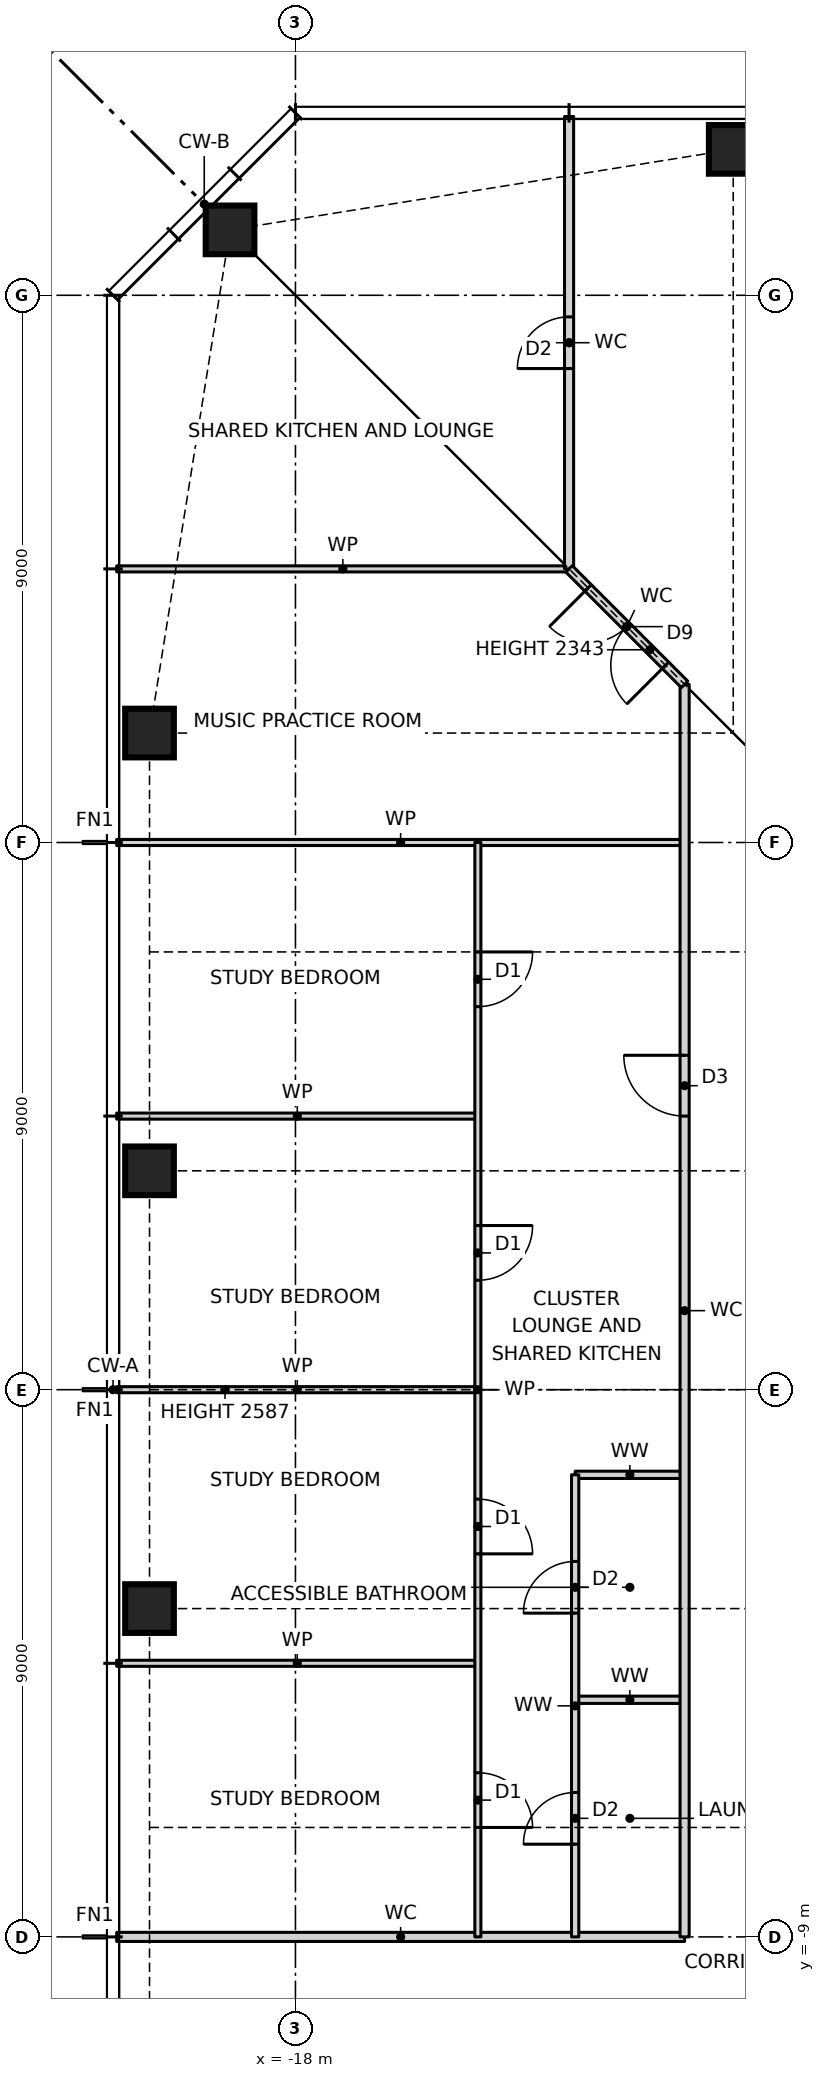
"""IFC4 building model, lengths in metres.
Left out: names, types, materials, properties, quantities, classifications, styles, units other than length and angle.
Written with IfcOpenShell. Run it as: python <this file> out.ifc"""

import sys

from ifc_helpers import new_model, si_unit, direction, frame, frame_2d, origin, origin_2d, place, context, subcontext, project, spatial, rectangle, hollow_rectangle, extrude, element, fill, save


model = new_model("IFC4")
c1 = context("Model", 3, precision=1e-05, world=origin(), true_north=direction((0.0, 1.0)))
c2 = subcontext(c1, "Body", "Model", "MODEL_VIEW")
j1 = project(units=[si_unit("LENGTHUNIT", "METRE"), si_unit("PLANEANGLEUNIT", "RADIAN")], contexts=[c1])
p1 = place(None, origin())
s1 = spatial("IfcSite", under=j1, at=p1, CompositionType="ELEMENT")
p2 = place(p1, origin())
s2 = spatial("IfcBuilding", under=s1, at=p2, CompositionType="ELEMENT")
p3 = place(p2, frame((0.0, 0.0, 105.0)))
s3 = spatial("IfcBuildingStorey", under=s2, at=p3, CompositionType="ELEMENT", Elevation=105.0)
for number, where, z_axis, x_axis in (
    (1, (-10.8, 20.4, 0.0), (0.0, 0.0, 1.0), (1.0, 0.0, 0.0)),
    (2, (-19.076, 19.076, 0.0), (0.0, 0.0, 1.0), (1.0, 0.0, 0.0)),
    (3, (-20.4, 10.8, 0.0), (0.0, 0.0, 1.0), (1.0, 0.0, 0.0)),
    (4, (-20.4, 3.6, 0.0), (0.0, 0.0, 1.0), (1.0, 0.0, 0.0)),
    (5, (-20.4, -3.6, 0.0), (0.0, 0.0, 1.0), (1.0, 0.0, 0.0)),
):
    element("IfcColumn", number, at=place(p3, frame(where, z_axis=z_axis, x_axis=x_axis)), inside=s3, PredefinedType="COLUMN", context=c2, shape_type="SweptSolid", body=[
        extrude(hollow_rectangle(XDim=0.8, YDim=0.8, WallThickness=0.07, at=origin_2d()), origin(), (0.0, 0.0, 1.0), 3.5),
    ])
p4 = place(p3, frame((-20.94, -9.0, 0.0), z_axis=(0.0, 0.0, 1.0), x_axis=(1.0, 0.0, 0.0)))
e6 = element("IfcWall", 6, at=p4, inside=s3, PredefinedType="PARTITIONING", context=c2, shape_type="SweptSolid", body=[
    extrude(rectangle(XDim=9.34, YDim=0.15, at=frame_2d((4.67, 0.0))), origin(), (0.0, 0.0, 1.0), 3.27),
])
p5 = place(p3, frame((-13.4, -5.1, 0.0), z_axis=(0.0, 0.0, 1.0), x_axis=(1.0, 0.0, 0.0)))
e7 = element("IfcWall", 7, at=p5, inside=s3, PredefinedType="PARTITIONING", context=c2, shape_type="SweptSolid", body=[
    extrude(rectangle(XDim=1.8, YDim=0.12, at=frame_2d((0.9, 0.0))), origin(), (0.0, 0.0, 1.0), 3.27),
])
p6 = place(p3, frame((-20.94, -4.5, 0.0), z_axis=(0.0, 0.0, 1.0), x_axis=(1.0, 0.0, 0.0)))
e8 = element("IfcWall", 8, at=p6, inside=s3, PredefinedType="PARTITIONING", context=c2, shape_type="SweptSolid", body=[
    extrude(rectangle(XDim=5.94, YDim=0.1, at=frame_2d((2.97, 0.0))), origin(), (0.0, 0.0, 1.0), 3.27),
])
p7 = place(p3, frame((-13.4, -1.4, 0.0), z_axis=(0.0, 0.0, 1.0), x_axis=(1.0, 0.0, 0.0)))
e9 = element("IfcWall", 9, at=p7, inside=s3, PredefinedType="PARTITIONING", context=c2, shape_type="SweptSolid", body=[
    extrude(rectangle(XDim=1.8, YDim=0.12, at=frame_2d((0.9, 0.0))), origin(), (0.0, 0.0, 1.0), 3.27),
])
p8 = place(p3, frame((-20.94, 0.0, 0.0), z_axis=(0.0, 0.0, 1.0), x_axis=(1.0, 0.0, 0.0)))
e10 = element("IfcWall", 10, at=p8, inside=s3, PredefinedType="PARTITIONING", context=c2, shape_type="SweptSolid", body=[
    extrude(rectangle(XDim=5.94, YDim=0.1, at=frame_2d((2.97, 0.0))), origin(), (0.0, 0.0, 1.0), 2.587),
])
p9 = place(p3, frame((-20.94, 4.5, 0.0), z_axis=(0.0, 0.0, 1.0), x_axis=(1.0, 0.0, 0.0)))
e11 = element("IfcWall", 11, at=p9, inside=s3, PredefinedType="PARTITIONING", context=c2, shape_type="SweptSolid", body=[
    extrude(rectangle(XDim=5.94, YDim=0.1, at=frame_2d((2.97, 0.0))), origin(), (0.0, 0.0, 1.0), 3.27),
])
p10 = place(p3, frame((-20.94, 9.0, 0.0), z_axis=(0.0, 0.0, 1.0), x_axis=(1.0, 0.0, 0.0)))
e12 = element("IfcWall", 12, at=p10, inside=s3, PredefinedType="PARTITIONING", context=c2, shape_type="SweptSolid", body=[
    extrude(rectangle(XDim=9.34, YDim=0.1, at=frame_2d((4.67, 0.0))), origin(), (0.0, 0.0, 1.0), 3.27),
])
p11 = place(p3, frame((-20.94, 13.5, 0.0), z_axis=(0.0, 0.0, 1.0), x_axis=(1.0, 0.0, 0.0)))
e13 = element("IfcWall", 13, at=p11, inside=s3, PredefinedType="PARTITIONING", context=c2, shape_type="SweptSolid", body=[
    extrude(rectangle(XDim=7.44, YDim=0.1, at=frame_2d((3.72, 0.0))), origin(), (0.0, 0.0, 1.0), 3.27),
])
p12 = place(p3, frame((-11.6, -9.0, 0.0), z_axis=(0.0, 0.0, 1.0), x_axis=(0.0, 1.0, 0.0)))
e14 = element("IfcWall", 14, at=p12, inside=s3, PredefinedType="PARTITIONING", context=c2, shape_type="SweptSolid", body=[
    extrude(rectangle(XDim=20.6, YDim=0.15, at=frame_2d((10.3, 0.0))), origin(), (0.0, 0.0, 1.0), 3.27),
])
p13 = place(p12, frame((13.5, 0.0, 0.0)))
e15 = element("IfcOpeningElement", 15, at=p13, cuts=e14, PredefinedType="OPENING", context=c2, shape_type="SweptSolid", body=[
    extrude(rectangle(XDim=1.0, YDim=2.1, at=frame_2d((0.5, 1.05))), frame((0.0, 0.085, 0.0), z_axis=(0.0, -1.0, 0.0), x_axis=(1.0, 0.0, 0.0)), (0.0, 0.0, 1.0), 0.17),
])
p14 = place(p3, frame((-13.4, -9.0, 0.0), z_axis=(0.0, 0.0, 1.0), x_axis=(0.0, 1.0, 0.0)))
e16 = element("IfcWall", 16, at=p14, inside=s3, PredefinedType="PARTITIONING", context=c2, shape_type="SweptSolid", body=[
    extrude(rectangle(XDim=7.6, YDim=0.12, at=frame_2d((3.8, 0.0))), origin(), (0.0, 0.0, 1.0), 3.27),
])
p15 = place(p14, frame((5.325, 0.0, 0.0)))
e17 = element("IfcOpeningElement", 17, at=p15, cuts=e16, PredefinedType="OPENING", context=c2, shape_type="SweptSolid", body=[
    extrude(rectangle(XDim=0.85, YDim=2.1, at=frame_2d((0.425, 1.05))), frame((0.0, 0.07, 0.0), z_axis=(0.0, -1.0, 0.0), x_axis=(1.0, 0.0, 0.0)), (0.0, 0.0, 1.0), 0.14),
])
p16 = place(p14, frame((1.525, 0.0, 0.0)))
e18 = element("IfcOpeningElement", 18, at=p16, cuts=e16, PredefinedType="OPENING", context=c2, shape_type="SweptSolid", body=[
    extrude(rectangle(XDim=0.85, YDim=2.1, at=frame_2d((0.425, 1.05))), frame((0.0, 0.07, 0.0), z_axis=(0.0, -1.0, 0.0), x_axis=(1.0, 0.0, 0.0)), (0.0, 0.0, 1.0), 0.14),
])
p17 = place(p3, frame((-13.5, 13.5, 0.0), z_axis=(0.0, 0.0, 1.0), x_axis=(0.0, 1.0, 0.0)))
e19 = element("IfcWall", 19, at=p17, inside=s3, PredefinedType="PARTITIONING", context=c2, shape_type="SweptSolid", body=[
    extrude(rectangle(XDim=7.44, YDim=0.15, at=frame_2d((3.72, 0.0))), origin(), (0.0, 0.0, 1.0), 3.27),
])
p18 = place(p17, frame((3.295, 0.0, 0.0)))
e20 = element("IfcOpeningElement", 20, at=p18, cuts=e19, PredefinedType="OPENING", context=c2, shape_type="SweptSolid", body=[
    extrude(rectangle(XDim=0.85, YDim=2.1, at=frame_2d((0.425, 1.05))), frame((0.0, 0.085, 0.0), z_axis=(0.0, -1.0, 0.0), x_axis=(1.0, 0.0, 0.0)), (0.0, 0.0, 1.0), 0.17),
])
p19 = place(p3, frame((-15.0, -9.0, 0.0), z_axis=(0.0, 0.0, 1.0), x_axis=(0.0, 1.0, 0.0)))
e21 = element("IfcWall", 21, at=p19, inside=s3, PredefinedType="PARTITIONING", context=c2, shape_type="SweptSolid", body=[
    extrude(rectangle(XDim=18.0, YDim=0.1, at=frame_2d((9.0, 0.0))), origin(), (0.0, 0.0, 1.0), 3.27),
])
p20 = place(p19, frame((15.3, 0.0, 0.0)))
e22 = element("IfcOpeningElement", 22, at=p20, cuts=e21, PredefinedType="OPENING", context=c2, shape_type="SweptSolid", body=[
    extrude(rectangle(XDim=0.9, YDim=2.1, at=frame_2d((0.45, 1.05))), frame((0.0, 0.06, 0.0), z_axis=(0.0, -1.0, 0.0), x_axis=(1.0, 0.0, 0.0)), (0.0, 0.0, 1.0), 0.12),
])
p21 = place(p19, frame((10.8, 0.0, 0.0)))
e23 = element("IfcOpeningElement", 23, at=p21, cuts=e21, PredefinedType="OPENING", context=c2, shape_type="SweptSolid", body=[
    extrude(rectangle(XDim=0.9, YDim=2.1, at=frame_2d((0.45, 1.05))), frame((0.0, 0.06, 0.0), z_axis=(0.0, -1.0, 0.0), x_axis=(1.0, 0.0, 0.0)), (0.0, 0.0, 1.0), 0.12),
])
p22 = place(p19, frame((6.3, 0.0, 0.0)))
e24 = element("IfcOpeningElement", 24, at=p22, cuts=e21, PredefinedType="OPENING", context=c2, shape_type="SweptSolid", body=[
    extrude(rectangle(XDim=0.9, YDim=2.1, at=frame_2d((0.45, 1.05))), frame((0.0, 0.06, 0.0), z_axis=(0.0, -1.0, 0.0), x_axis=(1.0, 0.0, 0.0)), (0.0, 0.0, 1.0), 0.12),
])
p23 = place(p19, frame((1.8, 0.0, 0.0)))
e25 = element("IfcOpeningElement", 25, at=p23, cuts=e21, PredefinedType="OPENING", context=c2, shape_type="SweptSolid", body=[
    extrude(rectangle(XDim=0.9, YDim=2.1, at=frame_2d((0.45, 1.05))), frame((0.0, 0.06, 0.0), z_axis=(0.0, -1.0, 0.0), x_axis=(1.0, 0.0, 0.0)), (0.0, 0.0, 1.0), 0.12),
])
p24 = place(p3, frame((-11.6, 11.6, 0.0), z_axis=(0.0, 0.0, 1.0), x_axis=(-0.707106781187, 0.707106781187, 0.0)))
e26 = element("IfcWall", 26, at=p24, inside=s3, PredefinedType="PARTITIONING", context=c2, shape_type="SweptSolid", body=[
    extrude(rectangle(XDim=2.687, YDim=0.15, at=frame_2d((1.343, 0.0))), origin(), (0.0, 0.0, 1.0), 2.343),
])
p25 = place(p24, frame((0.444, 0.0, 0.0)))
e27 = element("IfcOpeningElement", 27, at=p25, cuts=e26, PredefinedType="OPENING", context=c2, shape_type="SweptSolid", body=[
    extrude(rectangle(XDim=1.8, YDim=2.1, at=frame_2d((0.9, 1.05))), frame((0.0, 0.085, 0.0), z_axis=(0.0, -1.0, 0.0), x_axis=(1.0, 0.0, 0.0)), (0.0, 0.0, 1.0), 0.17),
])
p26 = place(p25, origin())
e28 = element("IfcDoor", 28, at=p26, inside=s3, OperationType="DOUBLE_DOOR_SINGLE_SWING", PredefinedType="DOOR", context=c2, shape_type="SweptSolid", body=[
    extrude(rectangle(XDim=1.8, YDim=2.1, at=frame_2d((0.9, 1.05))), frame((0.0, 0.025, 0.0), z_axis=(0.0, -1.0, 0.0), x_axis=(1.0, 0.0, 0.0)), (0.0, 0.0, 1.0), 0.05),
])
fill(e27, e28)
p27 = place(p20, frame((0.9, 0.0, 0.0), z_axis=(0.0, 0.0, 1.0), x_axis=(-1.0, 0.0, 0.0)))
e29 = element("IfcDoor", 29, at=p27, inside=s3, OperationType="SINGLE_SWING_LEFT", PredefinedType="DOOR", context=c2, shape_type="SweptSolid", body=[
    extrude(rectangle(XDim=0.9, YDim=2.1, at=frame_2d((0.45, 1.05))), frame((0.0, 0.025, 0.0), z_axis=(0.0, -1.0, 0.0), x_axis=(1.0, 0.0, 0.0)), (0.0, 0.0, 1.0), 0.05),
])
fill(e22, e29)
p28 = place(p21, frame((0.9, 0.0, 0.0), z_axis=(0.0, 0.0, 1.0), x_axis=(-1.0, 0.0, 0.0)))
e30 = element("IfcDoor", 30, at=p28, inside=s3, OperationType="SINGLE_SWING_LEFT", PredefinedType="DOOR", context=c2, shape_type="SweptSolid", body=[
    extrude(rectangle(XDim=0.9, YDim=2.1, at=frame_2d((0.45, 1.05))), frame((0.0, 0.025, 0.0), z_axis=(0.0, -1.0, 0.0), x_axis=(1.0, 0.0, 0.0)), (0.0, 0.0, 1.0), 0.05),
])
fill(e23, e30)
p29 = place(p22, frame((0.9, 0.0, 0.0), z_axis=(0.0, 0.0, 1.0), x_axis=(-1.0, 0.0, 0.0)))
e31 = element("IfcDoor", 31, at=p29, inside=s3, OperationType="SINGLE_SWING_RIGHT", PredefinedType="DOOR", context=c2, shape_type="SweptSolid", body=[
    extrude(rectangle(XDim=0.9, YDim=2.1, at=frame_2d((0.45, 1.05))), frame((0.0, 0.025, 0.0), z_axis=(0.0, -1.0, 0.0), x_axis=(1.0, 0.0, 0.0)), (0.0, 0.0, 1.0), 0.05),
])
fill(e24, e31)
p30 = place(p23, frame((0.9, 0.0, 0.0), z_axis=(0.0, 0.0, 1.0), x_axis=(-1.0, 0.0, 0.0)))
e32 = element("IfcDoor", 32, at=p30, inside=s3, OperationType="SINGLE_SWING_RIGHT", PredefinedType="DOOR", context=c2, shape_type="SweptSolid", body=[
    extrude(rectangle(XDim=0.9, YDim=2.1, at=frame_2d((0.45, 1.05))), frame((0.0, 0.025, 0.0), z_axis=(0.0, -1.0, 0.0), x_axis=(1.0, 0.0, 0.0)), (0.0, 0.0, 1.0), 0.05),
])
fill(e25, e32)
p31 = place(p13, origin())
e33 = element("IfcDoor", 33, at=p31, inside=s3, OperationType="SINGLE_SWING_RIGHT", PredefinedType="DOOR", context=c2, shape_type="SweptSolid", body=[
    extrude(rectangle(XDim=1.0, YDim=2.1, at=frame_2d((0.5, 1.05))), frame((0.0, 0.025, 0.0), z_axis=(0.0, -1.0, 0.0), x_axis=(1.0, 0.0, 0.0)), (0.0, 0.0, 1.0), 0.05),
])
fill(e15, e33)
p32 = place(p15, origin())
e34 = element("IfcDoor", 34, at=p32, inside=s3, OperationType="SINGLE_SWING_LEFT", PredefinedType="DOOR", context=c2, shape_type="SweptSolid", body=[
    extrude(rectangle(XDim=0.85, YDim=2.1, at=frame_2d((0.425, 1.05))), frame((0.0, 0.025, 0.0), z_axis=(0.0, -1.0, 0.0), x_axis=(1.0, 0.0, 0.0)), (0.0, 0.0, 1.0), 0.05),
])
fill(e17, e34)
p33 = place(p16, origin())
e35 = element("IfcDoor", 35, at=p33, inside=s3, OperationType="SINGLE_SWING_LEFT", PredefinedType="DOOR", context=c2, shape_type="SweptSolid", body=[
    extrude(rectangle(XDim=0.85, YDim=2.1, at=frame_2d((0.425, 1.05))), frame((0.0, 0.025, 0.0), z_axis=(0.0, -1.0, 0.0), x_axis=(1.0, 0.0, 0.0)), (0.0, 0.0, 1.0), 0.05),
])
fill(e18, e35)
p34 = place(p18, origin())
e36 = element("IfcDoor", 36, at=p34, inside=s3, OperationType="SINGLE_SWING_LEFT", PredefinedType="DOOR", context=c2, shape_type="SweptSolid", body=[
    extrude(rectangle(XDim=0.85, YDim=2.1, at=frame_2d((0.425, 1.05))), frame((0.0, 0.025, 0.0), z_axis=(0.0, -1.0, 0.0), x_axis=(1.0, 0.0, 0.0)), (0.0, 0.0, 1.0), 0.05),
])
fill(e20, e36)
save(model, sys.argv[1])
